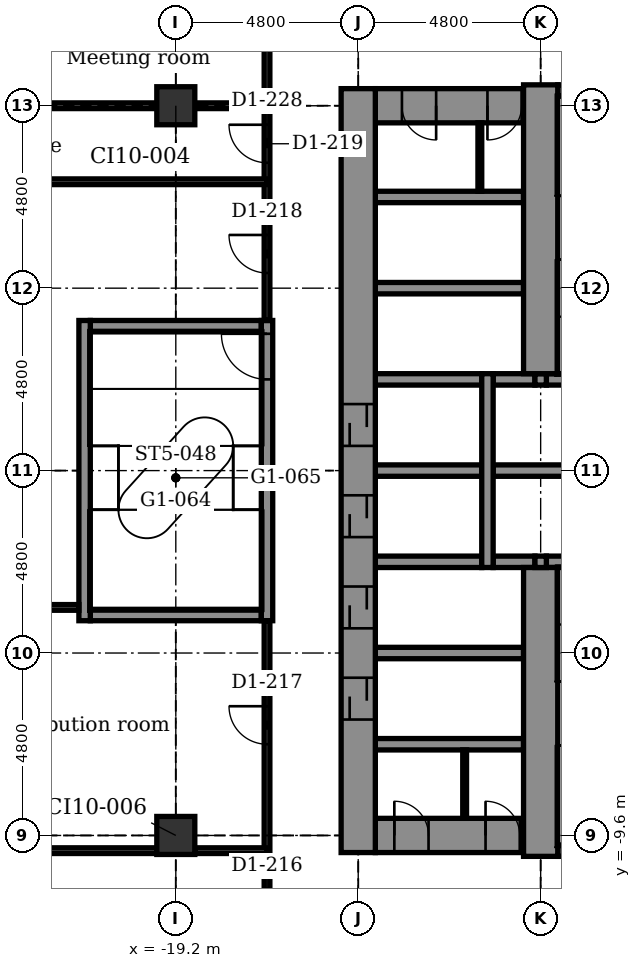
"""IFC4 building model, lengths in metres.
Left out: names, types, materials, properties, quantities, classifications, styles, units other than length and angle.
Written with IfcOpenShell. Run it as: python <this file> out.ifc"""

import sys

from ifc_helpers import new_model, si_unit, direction, frame, frame_2d, origin, origin_2d, place, context, subcontext, project, spatial, rectangle, extrude, element, fill, save


model = new_model("IFC4")
c1 = context("Model", 3, precision=1e-05, world=origin(), true_north=direction((0.0, 1.0)))
c2 = subcontext(c1, "Body", "Model", "MODEL_VIEW")
j1 = project(units=[si_unit("LENGTHUNIT", "METRE"), si_unit("PLANEANGLEUNIT", "RADIAN")], contexts=[c1])
p1 = place(None, origin())
s1 = spatial("IfcSite", under=j1, at=p1, CompositionType="ELEMENT")
p2 = place(p1, origin())
s2 = spatial("IfcBuilding", under=s1, at=p2, CompositionType="ELEMENT")
p3 = place(p2, frame((0.0, 0.0, 77.9)))
s3 = spatial("IfcBuildingStorey", under=s2, at=p3, CompositionType="ELEMENT", Elevation=77.9)
for number, where, z_axis, x_axis in (
    (1, (-19.2, -9.6, -0.2), (0.0, 0.0, 1.0), (1.0, 0.0, 0.0)),
    (2, (-19.2, 9.6, -0.2), (0.0, 0.0, 1.0), (1.0, 0.0, 0.0)),
):
    element("IfcColumn", number, at=place(p3, frame(where, z_axis=z_axis, x_axis=x_axis)), inside=s3, PredefinedType="COLUMN", context=c2, shape_type="SweptSolid", body=[
        extrude(rectangle(XDim=1.0, YDim=1.0, at=origin_2d()), origin(), (0.0, 0.0, 1.0), 4.5),
    ])
p4 = place(p3, frame((-9.15, -10.0, -0.2), z_axis=(0.0, 0.0, 1.0), x_axis=(1.0, 0.0, 0.0)))
e3 = element("IfcWall", 3, at=p4, inside=s3, PredefinedType="STANDARD", context=c2, shape_type="SweptSolid", body=[
    extrude(rectangle(XDim=3.9, YDim=0.3, at=frame_2d((1.95, 0.0))), origin(), (0.0, 0.0, 1.0), 4.5),
])
p5 = place(p3, frame((-13.95, -9.6, -0.2), z_axis=(0.0, 0.0, 1.0), x_axis=(1.0, 0.0, 0.0)))
e4 = element("IfcWall", 4, at=p5, inside=s3, PredefinedType="SHEAR", context=c2, shape_type="SweptSolid", body=[
    extrude(rectangle(XDim=3.9, YDim=0.9, at=frame_2d((1.95, 0.0))), origin(), (0.0, 0.0, 1.0), 4.5),
])
p6 = place(p5, frame((0.5, 0.0, 0.2)))
e5 = element("IfcOpeningElement", 5, at=p6, cuts=e4, PredefinedType="OPENING", context=c2, shape_type="SweptSolid", body=[
    extrude(rectangle(XDim=0.9, YDim=2.1, at=frame_2d((0.45, 1.05))), frame((0.0, 0.46, 0.0), z_axis=(0.0, -1.0, 0.0), x_axis=(1.0, 0.0, 0.0)), (0.0, 0.0, 1.0), 0.92),
])
p7 = place(p5, frame((2.9, 0.0, 0.2)))
e6 = element("IfcOpeningElement", 6, at=p7, cuts=e4, PredefinedType="OPENING", context=c2, shape_type="SweptSolid", body=[
    extrude(rectangle(XDim=0.9, YDim=2.1, at=frame_2d((0.45, 1.05))), frame((0.0, 0.46, 0.0), z_axis=(0.0, -1.0, 0.0), x_axis=(1.0, 0.0, 0.0)), (0.0, 0.0, 1.0), 0.92),
])
for number, where, z_axis, x_axis in (
    (7, (-13.95, -7.2, -0.2), (0.0, 0.0, 1.0), (1.0, 0.0, 0.0)),
    (8, (-13.95, -4.8, -0.2), (0.0, 0.0, 1.0), (1.0, 0.0, 0.0)),
):
    element("IfcWall", number, at=place(p3, frame(where, z_axis=z_axis, x_axis=x_axis)), inside=s3, PredefinedType="STANDARD", context=c2, shape_type="SweptSolid", body=[
        extrude(rectangle(XDim=3.9, YDim=0.3, at=frame_2d((1.95, 0.0))), origin(), (0.0, 0.0, 1.0), 4.5),
    ])
p8 = place(p3, frame((-21.45, -3.8, -0.2), z_axis=(0.0, 0.0, 1.0), x_axis=(1.0, 0.0, 0.0)))
e9 = element("IfcWall", 9, at=p8, inside=s3, PredefinedType="STANDARD", context=c2, shape_type="SweptSolid", body=[
    extrude(rectangle(XDim=4.5, YDim=0.3, at=frame_2d((2.25, 0.0))), origin(), (0.0, 0.0, 1.0), 4.5),
])
p9 = place(p3, frame((-13.95, -2.4, -0.2), z_axis=(0.0, 0.0, 1.0), x_axis=(1.0, 0.0, 0.0)))
e10 = element("IfcWall", 10, at=p9, inside=s3, PredefinedType="STANDARD", context=c2, shape_type="SweptSolid", body=[
    extrude(rectangle(XDim=2.8, YDim=0.3, at=frame_2d((1.4, 0.0))), origin(), (0.0, 0.0, 1.0), 4.5),
])
p10 = place(p3, frame((-10.85, -2.4, -0.2), z_axis=(0.0, 0.0, 1.0), x_axis=(1.0, 0.0, 0.0)))
e11 = element("IfcWall", 11, at=p10, inside=s3, PredefinedType="STANDARD", context=c2, shape_type="SweptSolid", body=[
    extrude(rectangle(XDim=1.1, YDim=0.3, at=frame_2d((0.55, 0.0))), origin(), (0.0, 0.0, 1.0), 4.5),
])
p11 = place(p3, frame((-9.45, -2.4, -0.2), z_axis=(0.0, 0.0, 1.0), x_axis=(1.0, 0.0, 0.0)))
e12 = element("IfcWall", 12, at=p11, inside=s3, PredefinedType="STANDARD", context=c2, shape_type="SweptSolid", body=[
    extrude(rectangle(XDim=1.9, YDim=0.3, at=frame_2d((0.95, 0.0))), origin(), (0.0, 0.0, 1.0), 4.5),
])
p12 = place(p3, frame((-13.95, 0.0, -0.2), z_axis=(0.0, 0.0, 1.0), x_axis=(1.0, 0.0, 0.0)))
e13 = element("IfcWall", 13, at=p12, inside=s3, PredefinedType="STANDARD", context=c2, shape_type="SweptSolid", body=[
    extrude(rectangle(XDim=2.8, YDim=0.3, at=frame_2d((1.4, 0.0))), origin(), (0.0, 0.0, 1.0), 4.5),
])
p13 = place(p3, frame((-10.85, 0.0, -0.2), z_axis=(0.0, 0.0, 1.0), x_axis=(1.0, 0.0, 0.0)))
e14 = element("IfcWall", 14, at=p13, inside=s3, PredefinedType="STANDARD", context=c2, shape_type="SweptSolid", body=[
    extrude(rectangle(XDim=3.3, YDim=0.3, at=frame_2d((1.65, 0.0))), origin(), (0.0, 0.0, 1.0), 4.5),
])
p14 = place(p3, frame((-13.95, 2.4, -0.2), z_axis=(0.0, 0.0, 1.0), x_axis=(1.0, 0.0, 0.0)))
e15 = element("IfcWall", 15, at=p14, inside=s3, PredefinedType="STANDARD", context=c2, shape_type="SweptSolid", body=[
    extrude(rectangle(XDim=2.8, YDim=0.3, at=frame_2d((1.4, 0.0))), origin(), (0.0, 0.0, 1.0), 4.5),
])
p15 = place(p3, frame((-10.85, 2.4, -0.2), z_axis=(0.0, 0.0, 1.0), x_axis=(1.0, 0.0, 0.0)))
e16 = element("IfcWall", 16, at=p15, inside=s3, PredefinedType="STANDARD", context=c2, shape_type="SweptSolid", body=[
    extrude(rectangle(XDim=1.1, YDim=0.3, at=frame_2d((0.55, 0.0))), origin(), (0.0, 0.0, 1.0), 4.5),
])
p16 = place(p3, frame((-9.45, 2.4, -0.2), z_axis=(0.0, 0.0, 1.0), x_axis=(1.0, 0.0, 0.0)))
e17 = element("IfcWall", 17, at=p16, inside=s3, PredefinedType="STANDARD", context=c2, shape_type="SweptSolid", body=[
    extrude(rectangle(XDim=1.9, YDim=0.3, at=frame_2d((0.95, 0.0))), origin(), (0.0, 0.0, 1.0), 4.5),
])
p17 = place(p3, frame((-21.45, 3.8, -0.2), z_axis=(0.0, 0.0, 1.0), x_axis=(1.0, 0.0, 0.0)))
e18 = element("IfcWall", 18, at=p17, inside=s3, PredefinedType="STANDARD", context=c2, shape_type="SweptSolid", body=[
    extrude(rectangle(XDim=4.5, YDim=0.3, at=frame_2d((2.25, 0.0))), origin(), (0.0, 0.0, 1.0), 4.5),
])
for number, where, z_axis, x_axis in (
    (19, (-13.95, 4.8, -0.2), (0.0, 0.0, 1.0), (1.0, 0.0, 0.0)),
    (20, (-13.95, 7.2, -0.2), (0.0, 0.0, 1.0), (1.0, 0.0, 0.0)),
):
    element("IfcWall", number, at=place(p3, frame(where, z_axis=z_axis, x_axis=x_axis)), inside=s3, PredefinedType="STANDARD", context=c2, shape_type="SweptSolid", body=[
        extrude(rectangle(XDim=3.9, YDim=0.3, at=frame_2d((1.95, 0.0))), origin(), (0.0, 0.0, 1.0), 4.5),
    ])
p18 = place(p3, frame((-13.95, 9.6, -0.2), z_axis=(0.0, 0.0, 1.0), x_axis=(1.0, 0.0, 0.0)))
e21 = element("IfcWall", 21, at=p18, inside=s3, PredefinedType="SHEAR", context=c2, shape_type="SweptSolid", body=[
    extrude(rectangle(XDim=3.9, YDim=0.9, at=frame_2d((1.95, 0.0))), origin(), (0.0, 0.0, 1.0), 4.5),
])
p19 = place(p18, frame((0.7, 0.0, 0.2)))
e22 = element("IfcOpeningElement", 22, at=p19, cuts=e21, PredefinedType="OPENING", context=c2, shape_type="SweptSolid", body=[
    extrude(rectangle(XDim=0.9, YDim=2.1, at=frame_2d((0.45, 1.05))), frame((0.0, 0.46, 0.0), z_axis=(0.0, -1.0, 0.0), x_axis=(1.0, 0.0, 0.0)), (0.0, 0.0, 1.0), 0.92),
])
p20 = place(p18, frame((2.95, 0.0, 0.2)))
e23 = element("IfcOpeningElement", 23, at=p20, cuts=e21, PredefinedType="OPENING", context=c2, shape_type="SweptSolid", body=[
    extrude(rectangle(XDim=0.9, YDim=2.1, at=frame_2d((0.45, 1.05))), frame((0.0, 0.46, 0.0), z_axis=(0.0, -1.0, 0.0), x_axis=(1.0, 0.0, 0.0)), (0.0, 0.0, 1.0), 0.92),
])
p21 = place(p3, frame((-9.15, 10.0, -0.2), z_axis=(0.0, 0.0, 1.0), x_axis=(1.0, 0.0, 0.0)))
e24 = element("IfcWall", 24, at=p21, inside=s3, PredefinedType="STANDARD", context=c2, shape_type="SweptSolid", body=[
    extrude(rectangle(XDim=3.9, YDim=0.3, at=frame_2d((1.95, 0.0))), origin(), (0.0, 0.0, 1.0), 4.5),
])
p22 = place(p3, frame((-21.6, -3.95, -0.2), z_axis=(0.0, 0.0, 1.0), x_axis=(0.0, 1.0, 0.0)))
e25 = element("IfcWall", 25, at=p22, inside=s3, PredefinedType="STANDARD", context=c2, shape_type="SweptSolid", body=[
    extrude(rectangle(XDim=7.9, YDim=0.3, at=frame_2d((3.95, 0.0))), origin(), (0.0, 0.0, 1.0), 4.5),
])
p23 = place(p3, frame((-16.8, -3.95, -0.2), z_axis=(0.0, 0.0, 1.0), x_axis=(0.0, 1.0, 0.0)))
e26 = element("IfcWall", 26, at=p23, inside=s3, PredefinedType="STANDARD", context=c2, shape_type="SweptSolid", body=[
    extrude(rectangle(XDim=7.9, YDim=0.3, at=frame_2d((3.95, 0.0))), origin(), (0.0, 0.0, 1.0), 4.5),
])
p24 = place(p23, frame((6.35, 0.0, 0.2)))
e27 = element("IfcOpeningElement", 27, at=p24, cuts=e26, PredefinedType="OPENING", context=c2, shape_type="SweptSolid", body=[
    extrude(rectangle(XDim=1.2, YDim=2.1, at=frame_2d((0.6, 1.05))), frame((0.0, 0.16, 0.0), z_axis=(0.0, -1.0, 0.0), x_axis=(1.0, 0.0, 0.0)), (0.0, 0.0, 1.0), 0.32),
])
p25 = place(p3, frame((-14.4, -10.05, -0.2), z_axis=(0.0, 0.0, 1.0), x_axis=(0.0, 1.0, 0.0)))
e28 = element("IfcWall", 28, at=p25, inside=s3, PredefinedType="SHEAR", context=c2, shape_type="SweptSolid", body=[
    extrude(rectangle(XDim=20.1, YDim=0.9, at=frame_2d((10.05, 0.0))), origin(), (0.0, 0.0, 1.0), 4.5),
])
p26 = place(p25, frame((3.5, 0.0, 0.2)))
e29 = element("IfcOpeningElement", 29, at=p26, cuts=e28, PredefinedType="OPENING", context=c2, shape_type="SweptSolid", body=[
    extrude(rectangle(XDim=1.1, YDim=2.1, at=frame_2d((0.55, 1.05))), frame((0.0, 0.46, 0.0), z_axis=(0.0, -1.0, 0.0), x_axis=(1.0, 0.0, 0.0)), (0.0, 0.0, 1.0), 0.92),
])
p27 = place(p25, frame((5.9, 0.0, 0.2)))
e30 = element("IfcOpeningElement", 30, at=p27, cuts=e28, PredefinedType="OPENING", context=c2, shape_type="SweptSolid", body=[
    extrude(rectangle(XDim=1.1, YDim=2.1, at=frame_2d((0.55, 1.05))), frame((0.0, 0.46, 0.0), z_axis=(0.0, -1.0, 0.0), x_axis=(1.0, 0.0, 0.0)), (0.0, 0.0, 1.0), 0.92),
])
p28 = place(p25, frame((8.3, 0.0, 0.2)))
e31 = element("IfcOpeningElement", 31, at=p28, cuts=e28, PredefinedType="OPENING", context=c2, shape_type="SweptSolid", body=[
    extrude(rectangle(XDim=1.1, YDim=2.1, at=frame_2d((0.55, 1.05))), frame((0.0, 0.46, 0.0), z_axis=(0.0, -1.0, 0.0), x_axis=(1.0, 0.0, 0.0)), (0.0, 0.0, 1.0), 0.92),
])
p29 = place(p25, frame((10.7, 0.0, 0.2)))
e32 = element("IfcOpeningElement", 32, at=p29, cuts=e28, PredefinedType="OPENING", context=c2, shape_type="SweptSolid", body=[
    extrude(rectangle(XDim=1.1, YDim=2.1, at=frame_2d((0.55, 1.05))), frame((0.0, 0.46, 0.0), z_axis=(0.0, -1.0, 0.0), x_axis=(1.0, 0.0, 0.0)), (0.0, 0.0, 1.0), 0.92),
])
p30 = place(p3, frame((-11.0, -2.55, -0.2), z_axis=(0.0, 0.0, 1.0), x_axis=(0.0, 1.0, 0.0)))
e33 = element("IfcWall", 33, at=p30, inside=s3, PredefinedType="STANDARD", context=c2, shape_type="SweptSolid", body=[
    extrude(rectangle(XDim=5.1, YDim=0.3, at=frame_2d((2.55, 0.0))), origin(), (0.0, 0.0, 1.0), 4.5),
])
p31 = place(p3, frame((-9.6, -10.15, -0.2), z_axis=(0.0, 0.0, 1.0), x_axis=(0.0, 1.0, 0.0)))
e34 = element("IfcWall", 34, at=p31, inside=s3, PredefinedType="SHEAR", context=c2, shape_type="SweptSolid", body=[
    extrude(rectangle(XDim=7.6, YDim=0.9, at=frame_2d((3.8, 0.0))), origin(), (0.0, 0.0, 1.0), 4.5),
])
for number, where, z_axis, x_axis in (
    (35, (-9.6, -2.55, -0.2), (0.0, 0.0, 1.0), (0.0, 1.0, 0.0)),
    (36, (-9.6, 2.25, -0.2), (0.0, 0.0, 1.0), (0.0, 1.0, 0.0)),
):
    element("IfcWall", number, at=place(p3, frame(where, z_axis=z_axis, x_axis=x_axis)), inside=s3, PredefinedType="STANDARD", context=c2, shape_type="SweptSolid", body=[
        extrude(rectangle(XDim=0.3, YDim=0.3, at=frame_2d((0.15, 0.0))), origin(), (0.0, 0.0, 1.0), 4.5),
    ])
p32 = place(p3, frame((-9.6, 2.55, -0.2), z_axis=(0.0, 0.0, 1.0), x_axis=(0.0, 1.0, 0.0)))
e37 = element("IfcWall", 37, at=p32, inside=s3, PredefinedType="SHEAR", context=c2, shape_type="SweptSolid", body=[
    extrude(rectangle(XDim=7.6, YDim=0.9, at=frame_2d((3.8, 0.0))), origin(), (0.0, 0.0, 1.0), 4.5),
])
for number, where, z_axis, x_axis in (
    (38, (-11.2, 7.35, 0.0), (0.0, 0.0, 1.0), (0.0, 1.0, 0.0)),
    (39, (-11.6, -9.15, 0.0), (0.0, 0.0, 1.0), (0.0, 1.0, 0.0)),
):
    element("IfcWall", number, at=place(p3, frame(where, z_axis=z_axis, x_axis=x_axis)), inside=s3, PredefinedType="PARTITIONING", context=c2, shape_type="SweptSolid", body=[
        extrude(rectangle(XDim=1.8, YDim=0.1, at=frame_2d((0.9, 0.0))), origin(), (0.0, 0.0, 1.0), 4.3),
    ])
p33 = place(p3, frame((-16.8, -13.0, 0.0), z_axis=(0.0, 0.0, 1.0), x_axis=(0.0, 1.0, 0.0)))
e40 = element("IfcWall", 40, at=p33, inside=s3, PredefinedType="PARTITIONING", context=c2, shape_type="SweptSolid", body=[
    extrude(rectangle(XDim=9.05, YDim=0.15, at=frame_2d((4.525, 0.0))), origin(), (0.0, 0.0, 1.0), 4.3),
])
p34 = place(p33, frame((1.0, 0.0, 0.0)))
e41 = element("IfcOpeningElement", 41, at=p34, cuts=e40, PredefinedType="OPENING", context=c2, shape_type="SweptSolid", body=[
    extrude(rectangle(XDim=1.0, YDim=2.1, at=frame_2d((0.5, 1.05))), frame((0.0, 0.085, 0.0), z_axis=(0.0, -1.0, 0.0), x_axis=(1.0, 0.0, 0.0)), (0.0, 0.0, 1.0), 0.17),
])
p35 = place(p33, frame((5.8, 0.0, 0.0)))
e42 = element("IfcOpeningElement", 42, at=p35, cuts=e40, PredefinedType="OPENING", context=c2, shape_type="SweptSolid", body=[
    extrude(rectangle(XDim=1.0, YDim=2.1, at=frame_2d((0.5, 1.05))), frame((0.0, 0.085, 0.0), z_axis=(0.0, -1.0, 0.0), x_axis=(1.0, 0.0, 0.0)), (0.0, 0.0, 1.0), 0.17),
])
p36 = place(p3, frame((-16.8, 3.95, 0.0), z_axis=(0.0, 0.0, 1.0), x_axis=(0.0, 1.0, 0.0)))
e43 = element("IfcWall", 43, at=p36, inside=s3, PredefinedType="PARTITIONING", context=c2, shape_type="SweptSolid", body=[
    extrude(rectangle(XDim=9.65, YDim=0.15, at=frame_2d((4.825, 0.0))), origin(), (0.0, 0.0, 1.0), 4.3),
])
p37 = place(p36, frame((1.25, 0.0, 0.0)))
e44 = element("IfcOpeningElement", 44, at=p37, cuts=e43, PredefinedType="OPENING", context=c2, shape_type="SweptSolid", body=[
    extrude(rectangle(XDim=1.0, YDim=2.1, at=frame_2d((0.5, 1.05))), frame((0.0, 0.085, 0.0), z_axis=(0.0, -1.0, 0.0), x_axis=(1.0, 0.0, 0.0)), (0.0, 0.0, 1.0), 0.17),
])
p38 = place(p36, frame((4.15, 0.0, 0.0)))
e45 = element("IfcOpeningElement", 45, at=p38, cuts=e43, PredefinedType="OPENING", context=c2, shape_type="SweptSolid", body=[
    extrude(rectangle(XDim=1.0, YDim=2.1, at=frame_2d((0.5, 1.05))), frame((0.0, 0.085, 0.0), z_axis=(0.0, -1.0, 0.0), x_axis=(1.0, 0.0, 0.0)), (0.0, 0.0, 1.0), 0.17),
])
p39 = place(p36, frame((7.35, 0.0, 0.0)))
e46 = element("IfcOpeningElement", 46, at=p39, cuts=e43, PredefinedType="OPENING", context=c2, shape_type="SweptSolid", body=[
    extrude(rectangle(XDim=1.0, YDim=2.1, at=frame_2d((0.5, 1.05))), frame((0.0, 0.085, 0.0), z_axis=(0.0, -1.0, 0.0), x_axis=(1.0, 0.0, 0.0)), (0.0, 0.0, 1.0), 0.17),
])
p40 = place(p3, frame((-25.956, -10.0, 0.0), z_axis=(0.0, 0.0, 1.0), x_axis=(1.0, 0.0, 0.0)))
e47 = element("IfcWall", 47, at=p40, inside=s3, PredefinedType="PARTITIONING", context=c2, shape_type="SweptSolid", body=[
    extrude(rectangle(XDim=6.256, YDim=0.15, at=frame_2d((3.128, 0.0))), origin(), (0.0, 0.0, 1.0), 4.3),
])
p41 = place(p3, frame((-18.7, -10.0, 0.0), z_axis=(0.0, 0.0, 1.0), x_axis=(1.0, 0.0, 0.0)))
e48 = element("IfcWall", 48, at=p41, inside=s3, PredefinedType="PARTITIONING", context=c2, shape_type="SweptSolid", body=[
    extrude(rectangle(XDim=1.9, YDim=0.15, at=frame_2d((0.95, 0.0))), origin(), (0.0, 0.0, 1.0), 4.3),
])
p42 = place(p3, frame((-29.651, -3.6, 0.0), z_axis=(0.0, 0.0, 1.0), x_axis=(1.0, 0.0, 0.0)))
e49 = element("IfcWall", 49, at=p42, inside=s3, PredefinedType="PARTITIONING", context=c2, shape_type="SweptSolid", body=[
    extrude(rectangle(XDim=7.901, YDim=0.15, at=frame_2d((3.95, 0.0))), origin(), (0.0, 0.0, 1.0), 4.3),
])
p43 = place(p3, frame((-27.342, 7.6, 0.0), z_axis=(0.0, 0.0, 1.0), x_axis=(1.0, 0.0, 0.0)))
e50 = element("IfcWall", 50, at=p43, inside=s3, PredefinedType="PARTITIONING", context=c2, shape_type="SweptSolid", body=[
    extrude(rectangle(XDim=10.542, YDim=0.15, at=frame_2d((5.271, 0.0))), origin(), (0.0, 0.0, 1.0), 4.3),
])
p44 = place(p3, frame((-26.187, 9.6, 0.0), z_axis=(0.0, 0.0, 1.0), x_axis=(1.0, 0.0, 0.0)))
e51 = element("IfcWall", 51, at=p44, inside=s3, PredefinedType="PARTITIONING", context=c2, shape_type="SweptSolid", body=[
    extrude(rectangle(XDim=6.487, YDim=0.15, at=frame_2d((3.243, 0.0))), origin(), (0.0, 0.0, 1.0), 3.692),
])
p45 = place(p3, frame((-18.7, 9.6, 0.0), z_axis=(0.0, 0.0, 1.0), x_axis=(1.0, 0.0, 0.0)))
e52 = element("IfcWall", 52, at=p45, inside=s3, PredefinedType="PARTITIONING", context=c2, shape_type="SweptSolid", body=[
    extrude(rectangle(XDim=1.9, YDim=0.15, at=frame_2d((0.95, 0.0))), origin(), (0.0, 0.0, 1.0), 3.692),
])
p46 = place(p35, origin())
e53 = element("IfcDoor", 53, at=p46, inside=s3, OperationType="SINGLE_SWING_RIGHT", PredefinedType="DOOR", context=c2, shape_type="SweptSolid", body=[
    extrude(rectangle(XDim=1.0, YDim=2.1, at=frame_2d((0.5, 1.05))), frame((0.0, 0.025, 0.0), z_axis=(0.0, -1.0, 0.0), x_axis=(1.0, 0.0, 0.0)), (0.0, 0.0, 1.0), 0.05),
])
fill(e42, e53)
p47 = place(p37, origin())
e54 = element("IfcDoor", 54, at=p47, inside=s3, OperationType="SINGLE_SWING_RIGHT", PredefinedType="DOOR", context=c2, shape_type="SweptSolid", body=[
    extrude(rectangle(XDim=1.0, YDim=2.1, at=frame_2d((0.5, 1.05))), frame((0.0, 0.025, 0.0), z_axis=(0.0, -1.0, 0.0), x_axis=(1.0, 0.0, 0.0)), (0.0, 0.0, 1.0), 0.05),
])
fill(e44, e54)
p48 = place(p38, origin())
e55 = element("IfcDoor", 55, at=p48, inside=s3, OperationType="SINGLE_SWING_RIGHT", PredefinedType="DOOR", context=c2, shape_type="SweptSolid", body=[
    extrude(rectangle(XDim=1.0, YDim=2.1, at=frame_2d((0.5, 1.05))), frame((0.0, 0.025, 0.0), z_axis=(0.0, -1.0, 0.0), x_axis=(1.0, 0.0, 0.0)), (0.0, 0.0, 1.0), 0.05),
])
fill(e45, e55)
p49 = place(p26, origin())
e56 = element("IfcDoor", 56, at=p49, inside=s3, OperationType="DOUBLE_DOOR_SLIDING", PredefinedType="DOOR", context=c2, shape_type="SweptSolid", body=[
    extrude(rectangle(XDim=1.1, YDim=2.1, at=frame_2d((0.55, 1.05))), frame((0.0, 0.025, 0.0), z_axis=(0.0, -1.0, 0.0), x_axis=(1.0, 0.0, 0.0)), (0.0, 0.0, 1.0), 0.05),
])
fill(e29, e56)
p50 = place(p27, origin())
e57 = element("IfcDoor", 57, at=p50, inside=s3, OperationType="DOUBLE_DOOR_SLIDING", PredefinedType="DOOR", context=c2, shape_type="SweptSolid", body=[
    extrude(rectangle(XDim=1.1, YDim=2.1, at=frame_2d((0.55, 1.05))), frame((0.0, 0.025, 0.0), z_axis=(0.0, -1.0, 0.0), x_axis=(1.0, 0.0, 0.0)), (0.0, 0.0, 1.0), 0.05),
])
fill(e30, e57)
p51 = place(p28, origin())
e58 = element("IfcDoor", 58, at=p51, inside=s3, OperationType="DOUBLE_DOOR_SLIDING", PredefinedType="DOOR", context=c2, shape_type="SweptSolid", body=[
    extrude(rectangle(XDim=1.1, YDim=2.1, at=frame_2d((0.55, 1.05))), frame((0.0, 0.025, 0.0), z_axis=(0.0, -1.0, 0.0), x_axis=(1.0, 0.0, 0.0)), (0.0, 0.0, 1.0), 0.05),
])
fill(e31, e58)
p52 = place(p29, origin())
e59 = element("IfcDoor", 59, at=p52, inside=s3, OperationType="DOUBLE_DOOR_SLIDING", PredefinedType="DOOR", context=c2, shape_type="SweptSolid", body=[
    extrude(rectangle(XDim=1.1, YDim=2.1, at=frame_2d((0.55, 1.05))), frame((0.0, 0.025, 0.0), z_axis=(0.0, -1.0, 0.0), x_axis=(1.0, 0.0, 0.0)), (0.0, 0.0, 1.0), 0.05),
])
fill(e32, e59)
p53 = place(p24, origin())
e60 = element("IfcDoor", 60, at=p53, inside=s3, OperationType="SINGLE_SWING_RIGHT", PredefinedType="DOOR", context=c2, shape_type="SweptSolid", body=[
    extrude(rectangle(XDim=1.2, YDim=2.1, at=frame_2d((0.6, 1.05))), frame((0.0, 0.025, 0.0), z_axis=(0.0, -1.0, 0.0), x_axis=(1.0, 0.0, 0.0)), (0.0, 0.0, 1.0), 0.05),
])
fill(e27, e60)
p54 = place(p6, origin())
e61 = element("IfcDoor", 61, at=p54, inside=s3, OperationType="SINGLE_SWING_LEFT", PredefinedType="DOOR", context=c2, shape_type="SweptSolid", body=[
    extrude(rectangle(XDim=0.9, YDim=2.1, at=frame_2d((0.45, 1.05))), frame((0.0, 0.025, 0.0), z_axis=(0.0, -1.0, 0.0), x_axis=(1.0, 0.0, 0.0)), (0.0, 0.0, 1.0), 0.05),
])
fill(e5, e61)
p55 = place(p7, origin())
e62 = element("IfcDoor", 62, at=p55, inside=s3, OperationType="SINGLE_SWING_LEFT", PredefinedType="DOOR", context=c2, shape_type="SweptSolid", body=[
    extrude(rectangle(XDim=0.9, YDim=2.1, at=frame_2d((0.45, 1.05))), frame((0.0, 0.025, 0.0), z_axis=(0.0, -1.0, 0.0), x_axis=(1.0, 0.0, 0.0)), (0.0, 0.0, 1.0), 0.05),
])
fill(e6, e62)
p56 = place(p19, frame((0.9, 0.0, 0.0), z_axis=(0.0, 0.0, 1.0), x_axis=(-1.0, 0.0, 0.0)))
e63 = element("IfcDoor", 63, at=p56, inside=s3, OperationType="SINGLE_SWING_RIGHT", PredefinedType="DOOR", context=c2, shape_type="SweptSolid", body=[
    extrude(rectangle(XDim=0.9, YDim=2.1, at=frame_2d((0.45, 1.05))), frame((0.0, 0.025, 0.0), z_axis=(0.0, -1.0, 0.0), x_axis=(1.0, 0.0, 0.0)), (0.0, 0.0, 1.0), 0.05),
])
fill(e22, e63)
p57 = place(p20, frame((0.9, 0.0, 0.0), z_axis=(0.0, 0.0, 1.0), x_axis=(-1.0, 0.0, 0.0)))
e64 = element("IfcDoor", 64, at=p57, inside=s3, OperationType="SINGLE_SWING_LEFT", PredefinedType="DOOR", context=c2, shape_type="SweptSolid", body=[
    extrude(rectangle(XDim=0.9, YDim=2.1, at=frame_2d((0.45, 1.05))), frame((0.0, 0.025, 0.0), z_axis=(0.0, -1.0, 0.0), x_axis=(1.0, 0.0, 0.0)), (0.0, 0.0, 1.0), 0.05),
])
fill(e23, e64)
save(model, sys.argv[1])
